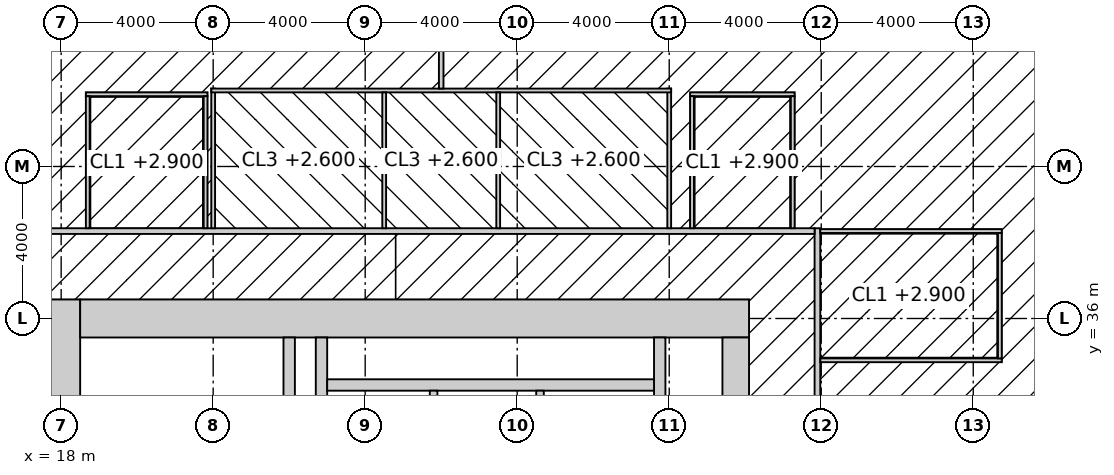
"""IFC4 building model, lengths in metres.
Left out: names, types, materials, properties, quantities, classifications, styles, units other than length and angle.
Written with IfcOpenShell. Run it as: python <this file> out.ifc"""

import sys

from ifc_helpers import new_model, si_unit, direction, frame, frame_2d, origin, place, context, subcontext, project, spatial, rectangle, extrude, element, fill, save


model = new_model("IFC4")
c1 = context("Model", 3, precision=1e-05, world=origin(), true_north=direction((0.0, 1.0)))
c2 = subcontext(c1, "Body", "Model", "MODEL_VIEW")
j1 = project(units=[si_unit("LENGTHUNIT", "METRE"), si_unit("PLANEANGLEUNIT", "RADIAN")], contexts=[c1])
p1 = place(None, origin())
s1 = spatial("IfcSite", under=j1, at=p1, CompositionType="ELEMENT")
p2 = place(p1, origin())
s2 = spatial("IfcBuilding", under=s1, at=p2, CompositionType="ELEMENT")
p3 = place(p2, frame((0.0, 0.0, 93.4)))
s3 = spatial("IfcBuildingStorey", under=s2, at=p3, CompositionType="ELEMENT", Elevation=93.4)
p4 = place(p3, frame((18.0, 17.5, -0.15), z_axis=(0.0, 0.0, 1.0), x_axis=(0.0, 1.0, 0.0)))
e1 = element("IfcWall", 1, at=p4, inside=s3, PredefinedType="SHEAR", context=c2, shape_type="SweptSolid", body=[
    extrude(rectangle(XDim=19.0, YDim=1.0, at=frame_2d((9.5, 0.0))), origin(), (0.0, 0.0, 1.0), 4.0),
])
p5 = place(p3, frame((18.5, 36.0, -0.15), z_axis=(0.0, 0.0, 1.0), x_axis=(1.0, 0.0, 0.0)))
e2 = element("IfcWall", 2, at=p5, inside=s3, PredefinedType="SHEAR", context=c2, shape_type="SweptSolid", body=[
    extrude(rectangle(XDim=17.6, YDim=1.0, at=frame_2d((8.8, 0.0))), origin(), (0.0, 0.0, 1.0), 4.0),
])
p6 = place(p3, frame((35.75, 18.5, -0.15), z_axis=(0.0, 0.0, 1.0), x_axis=(0.0, 1.0, 0.0)))
e3 = element("IfcWall", 3, at=p6, inside=s3, PredefinedType="SHEAR", context=c2, shape_type="SweptSolid", body=[
    extrude(rectangle(XDim=17.0, YDim=0.7, at=frame_2d((8.5, 0.0))), origin(), (0.0, 0.0, 1.0), 4.0),
])
p7 = place(p6, frame((9.85, 0.0, 0.15)))
e4 = element("IfcOpeningElement", 4, at=p7, cuts=e3, PredefinedType="OPENING", context=c2, shape_type="SweptSolid", body=[
    extrude(rectangle(XDim=1.0, YDim=2.2, at=frame_2d((0.5, 1.1))), frame((0.0, 0.36, 0.0), z_axis=(0.0, -1.0, 0.0), x_axis=(1.0, 0.0, 0.0)), (0.0, 0.0, 1.0), 0.72),
])
p8 = place(p3, frame((24.0, 18.5, -0.15), z_axis=(0.0, 0.0, 1.0), x_axis=(0.0, 1.0, 0.0)))
e5 = element("IfcWall", 5, at=p8, inside=s3, PredefinedType="SHEAR", context=c2, shape_type="SweptSolid", body=[
    extrude(rectangle(XDim=17.0, YDim=0.3, at=frame_2d((8.5, 0.0))), origin(), (0.0, 0.0, 1.0), 4.0),
])
p9 = place(p8, frame((9.6, 0.0, 0.15)))
e6 = element("IfcOpeningElement", 6, at=p9, cuts=e5, PredefinedType="OPENING", context=c2, shape_type="SweptSolid", body=[
    extrude(rectangle(XDim=1.5, YDim=2.4, at=frame_2d((0.75, 1.2))), frame((0.0, 0.16, 0.0), z_axis=(0.0, -1.0, 0.0), x_axis=(1.0, 0.0, 0.0)), (0.0, 0.0, 1.0), 0.32),
])
for number, where, z_axis, x_axis in (
    (7, (24.85, 31.3, -0.15), (0.0, 0.0, 1.0), (0.0, 1.0, 0.0)),
    (8, (33.75, 31.3, -0.15), (0.0, 0.0, 1.0), (0.0, 1.0, 0.0)),
):
    element("IfcWall", number, at=place(p3, frame(where, z_axis=z_axis, x_axis=x_axis)), inside=s3, PredefinedType="SHEAR", context=c2, shape_type="SweptSolid", body=[
        extrude(rectangle(XDim=4.2, YDim=0.3, at=frame_2d((2.1, 0.0))), origin(), (0.0, 0.0, 1.0), 4.0),
    ])
p10 = place(p3, frame((25.0, 34.25, -0.15), z_axis=(0.0, 0.0, 1.0), x_axis=(1.0, 0.0, 0.0)))
e9 = element("IfcWall", 9, at=p10, inside=s3, PredefinedType="SHEAR", context=c2, shape_type="SweptSolid", body=[
    extrude(rectangle(XDim=8.6, YDim=0.3, at=frame_2d((4.3, 0.0))), origin(), (0.0, 0.0, 1.0), 4.0),
])
for number, where, z_axis, x_axis in (
    (10, (27.8, 31.3, -0.15), (0.0, 0.0, 1.0), (0.0, 1.0, 0.0)),
    (11, (30.6, 31.3, -0.15), (0.0, 0.0, 1.0), (0.0, 1.0, 0.0)),
):
    element("IfcWall", number, at=place(p3, frame(where, z_axis=z_axis, x_axis=x_axis)), inside=s3, PredefinedType="SOLIDWALL", context=c2, shape_type="SweptSolid", body=[
        extrude(rectangle(XDim=2.8, YDim=0.2, at=frame_2d((1.4, 0.0))), origin(), (0.0, 0.0, 1.0), 4.0),
    ])
p11 = place(p3, frame((37.9, 15.625, 0.0), z_axis=(0.0, 0.0, 1.0), x_axis=(0.0, 1.0, 0.0)))
e12 = element("IfcWall", 12, at=p11, inside=s3, PredefinedType="PARTITIONING", context=c2, shape_type="SweptSolid", body=[
    extrude(rectangle(XDim=22.75, YDim=0.15, at=frame_2d((11.375, 0.0))), origin(), (0.0, 0.0, 1.0), 2.95),
])
p12 = place(p11, frame((4.974, 0.0, 0.0)))
e13 = element("IfcOpeningElement", 13, at=p12, cuts=e12, PredefinedType="OPENING", context=c2, shape_type="SweptSolid", body=[
    extrude(rectangle(XDim=1.8, YDim=2.4, at=frame_2d((0.9, 1.2))), frame((0.0, 0.085, 0.0), z_axis=(0.0, -1.0, 0.0), x_axis=(1.0, 0.0, 0.0)), (0.0, 0.0, 1.0), 0.17),
])
p13 = place(p11, frame((16.226, 0.0, 0.0)))
e14 = element("IfcOpeningElement", 14, at=p13, cuts=e12, PredefinedType="OPENING", context=c2, shape_type="SweptSolid", body=[
    extrude(rectangle(XDim=1.8, YDim=2.4, at=frame_2d((0.9, 1.2))), frame((0.0, 0.085, 0.0), z_axis=(0.0, -1.0, 0.0), x_axis=(1.0, 0.0, 0.0)), (0.0, 0.0, 1.0), 0.17),
])
p14 = place(p3, frame((15.775, 38.3, 0.0), z_axis=(0.0, 0.0, 1.0), x_axis=(1.0, 0.0, 0.0)))
e15 = element("IfcWall", 15, at=p14, inside=s3, PredefinedType="PARTITIONING", context=c2, shape_type="SweptSolid", body=[
    extrude(rectangle(XDim=22.05, YDim=0.15, at=frame_2d((11.025, 0.0))), origin(), (0.0, 0.0, 1.0), 3.85),
])
p15 = place(p14, frame((7.975, 0.0, 0.0)))
e16 = element("IfcOpeningElement", 16, at=p15, cuts=e15, PredefinedType="OPENING", context=c2, shape_type="SweptSolid", body=[
    extrude(rectangle(XDim=0.9, YDim=2.1, at=frame_2d((0.45, 1.05))), frame((0.0, 0.085, 0.0), z_axis=(0.0, -1.0, 0.0), x_axis=(1.0, 0.0, 0.0)), (0.0, 0.0, 1.0), 0.17),
])
p16 = place(p14, frame((11.725, 0.0, 0.0)))
e17 = element("IfcOpeningElement", 17, at=p16, cuts=e15, PredefinedType="OPENING", context=c2, shape_type="SweptSolid", body=[
    extrude(rectangle(XDim=1.0, YDim=2.1, at=frame_2d((0.5, 1.05))), frame((0.0, 0.085, 0.0), z_axis=(0.0, -1.0, 0.0), x_axis=(1.0, 0.0, 0.0)), (0.0, 0.0, 1.0), 0.17),
])
p17 = place(p14, frame((15.575, 0.0, 0.0)))
e18 = element("IfcOpeningElement", 18, at=p17, cuts=e15, PredefinedType="OPENING", context=c2, shape_type="SweptSolid", body=[
    extrude(rectangle(XDim=0.9, YDim=2.1, at=frame_2d((0.45, 1.05))), frame((0.0, 0.085, 0.0), z_axis=(0.0, -1.0, 0.0), x_axis=(1.0, 0.0, 0.0)), (0.0, 0.0, 1.0), 0.17),
])
for number, where, z_axis, x_axis in (
    (19, (22.0, 38.375, 0.0), (0.0, 0.0, 1.0), (0.0, 1.0, 0.0)),
    (20, (34.0, 38.375, 0.0), (0.0, 0.0, 1.0), (0.0, 1.0, 0.0)),
):
    element("IfcWall", number, at=place(p3, frame(where, z_axis=z_axis, x_axis=x_axis)), inside=s3, PredefinedType="PARTITIONING", context=c2, shape_type="SweptSolid", body=[
        extrude(rectangle(XDim=3.675, YDim=0.1, at=frame_2d((1.837, 0.0))), origin(), (0.0, 0.0, 1.0), 2.95),
    ])
p18 = place(p3, frame((21.95, 42.0, 0.0), z_axis=(0.0, 0.0, 1.0), x_axis=(1.0, 0.0, 0.0)))
e21 = element("IfcWall", 21, at=p18, inside=s3, PredefinedType="PARTITIONING", context=c2, shape_type="SweptSolid", body=[
    extrude(rectangle(XDim=12.1, YDim=0.1, at=frame_2d((6.05, 0.0))), origin(), (0.0, 0.0, 1.0), 3.85),
])
for number, where, z_axis, x_axis in (
    (22, (26.5, 38.375, 0.0), (0.0, 0.0, 1.0), (0.0, 1.0, 0.0)),
    (23, (29.5, 38.375, 0.0), (0.0, 0.0, 1.0), (0.0, 1.0, 0.0)),
):
    element("IfcWall", number, at=place(p3, frame(where, z_axis=z_axis, x_axis=x_axis)), inside=s3, PredefinedType="PARTITIONING", context=c2, shape_type="SweptSolid", body=[
        extrude(rectangle(XDim=3.575, YDim=0.1, at=frame_2d((1.788, 0.0))), origin(), (0.0, 0.0, 1.0), 3.85),
    ])
p19 = place(p3, frame((28.0, 42.05, 0.0), z_axis=(0.0, 0.0, 1.0), x_axis=(0.0, 1.0, 0.0)))
e24 = element("IfcWall", 24, at=p19, inside=s3, PredefinedType="PARTITIONING", context=c2, shape_type="SweptSolid", body=[
    extrude(rectangle(XDim=5.65, YDim=0.12, at=frame_2d((2.825, 0.0))), origin(), (0.0, 0.0, 1.0), 3.85),
])
for number, where, z_axis, x_axis in (
    (25, (37.975, 34.9, 0.0), (0.0, 0.0, 1.0), (1.0, 0.0, 0.0)),
    (26, (37.975, 38.3, 0.0), (0.0, 0.0, 1.0), (1.0, 0.0, 0.0)),
):
    element("IfcWall", number, at=place(p3, frame(where, z_axis=z_axis, x_axis=x_axis)), inside=s3, PredefinedType="PARTITIONING", context=c2, shape_type="SweptSolid", body=[
        extrude(rectangle(XDim=4.775, YDim=0.1, at=frame_2d((2.387, 0.0))), origin(), (0.0, 0.0, 1.0), 3.85),
    ])
p20 = place(p3, frame((18.65, 41.9, 0.0), z_axis=(0.0, 0.0, 1.0), x_axis=(1.0, 0.0, 0.0)))
e27 = element("IfcWall", 27, at=p20, inside=s3, PredefinedType="PARTITIONING", context=c2, shape_type="SweptSolid", body=[
    extrude(rectangle(XDim=3.2, YDim=0.1, at=frame_2d((1.6, 0.0))), origin(), (0.0, 0.0, 1.0), 3.85),
])
p21 = place(p20, frame((1.1, 0.0, 0.0)))
e28 = element("IfcOpeningElement", 28, at=p21, cuts=e27, PredefinedType="OPENING", context=c2, shape_type="SweptSolid", body=[
    extrude(rectangle(XDim=1.0, YDim=2.2, at=frame_2d((0.5, 1.1))), frame((0.0, 0.06, 0.0), z_axis=(0.0, -1.0, 0.0), x_axis=(1.0, 0.0, 0.0)), (0.0, 0.0, 1.0), 0.12),
])
p22 = place(p3, frame((34.55, 41.9, 0.0), z_axis=(0.0, 0.0, 1.0), x_axis=(1.0, 0.0, 0.0)))
e29 = element("IfcWall", 29, at=p22, inside=s3, PredefinedType="PARTITIONING", context=c2, shape_type="SweptSolid", body=[
    extrude(rectangle(XDim=2.75, YDim=0.1, at=frame_2d((1.375, 0.0))), origin(), (0.0, 0.0, 1.0), 3.85),
])
p23 = place(p22, frame((0.875, 0.0, 0.0)))
e30 = element("IfcOpeningElement", 30, at=p23, cuts=e29, PredefinedType="OPENING", context=c2, shape_type="SweptSolid", body=[
    extrude(rectangle(XDim=1.0, YDim=2.2, at=frame_2d((0.5, 1.1))), frame((0.0, 0.06, 0.0), z_axis=(0.0, -1.0, 0.0), x_axis=(1.0, 0.0, 0.0)), (0.0, 0.0, 1.0), 0.12),
])
for number, where, z_axis, x_axis in (
    (31, (18.7, 38.375, 0.0), (0.0, 0.0, 1.0), (0.0, 1.0, 0.0)),
    (32, (21.8, 38.375, 0.0), (0.0, 0.0, 1.0), (0.0, 1.0, 0.0)),
    (33, (34.6, 38.375, 0.0), (0.0, 0.0, 1.0), (0.0, 1.0, 0.0)),
    (34, (37.25, 38.375, 0.0), (0.0, 0.0, 1.0), (0.0, 1.0, 0.0)),
):
    element("IfcWall", number, at=place(p3, frame(where, z_axis=z_axis, x_axis=x_axis)), inside=s3, PredefinedType="PARTITIONING", context=c2, shape_type="SweptSolid", body=[
        extrude(rectangle(XDim=3.475, YDim=0.1, at=frame_2d((1.738, 0.0))), origin(), (0.0, 0.0, 1.0), 3.85),
    ])
p24 = place(p3, frame((42.7, 34.95, 0.0), z_axis=(0.0, 0.0, 1.0), x_axis=(0.0, 1.0, 0.0)))
e35 = element("IfcWall", 35, at=p24, inside=s3, PredefinedType="PARTITIONING", context=c2, shape_type="SweptSolid", body=[
    extrude(rectangle(XDim=3.3, YDim=0.1, at=frame_2d((1.65, 0.0))), origin(), (0.0, 0.0, 1.0), 3.85),
])
p25 = place(p24, frame((1.15, 0.0, 0.0)))
e36 = element("IfcOpeningElement", 36, at=p25, cuts=e35, PredefinedType="OPENING", context=c2, shape_type="SweptSolid", body=[
    extrude(rectangle(XDim=1.0, YDim=2.2, at=frame_2d((0.5, 1.1))), frame((0.0, 0.06, 0.0), z_axis=(0.0, -1.0, 0.0), x_axis=(1.0, 0.0, 0.0)), (0.0, 0.0, 1.0), 0.12),
])
p26 = place(p15, origin())
e37 = element("IfcDoor", 37, at=p26, inside=s3, OperationType="SINGLE_SWING_LEFT", PredefinedType="DOOR", context=c2, shape_type="SweptSolid", body=[
    extrude(rectangle(XDim=0.9, YDim=2.1, at=frame_2d((0.45, 1.05))), frame((0.0, 0.025, 0.0), z_axis=(0.0, -1.0, 0.0), x_axis=(1.0, 0.0, 0.0)), (0.0, 0.0, 1.0), 0.05),
])
fill(e16, e37)
p27 = place(p16, origin())
e38 = element("IfcDoor", 38, at=p27, inside=s3, OperationType="SLIDING_TO_LEFT", PredefinedType="DOOR", context=c2, shape_type="SweptSolid", body=[
    extrude(rectangle(XDim=1.0, YDim=2.1, at=frame_2d((0.5, 1.05))), frame((0.0, 0.025, 0.0), z_axis=(0.0, -1.0, 0.0), x_axis=(1.0, 0.0, 0.0)), (0.0, 0.0, 1.0), 0.05),
])
fill(e17, e38)
p28 = place(p17, origin())
e39 = element("IfcDoor", 39, at=p28, inside=s3, OperationType="SINGLE_SWING_LEFT", PredefinedType="DOOR", context=c2, shape_type="SweptSolid", body=[
    extrude(rectangle(XDim=0.9, YDim=2.1, at=frame_2d((0.45, 1.05))), frame((0.0, 0.025, 0.0), z_axis=(0.0, -1.0, 0.0), x_axis=(1.0, 0.0, 0.0)), (0.0, 0.0, 1.0), 0.05),
])
fill(e18, e39)
p29 = place(p21, origin())
e40 = element("IfcDoor", 40, at=p29, inside=s3, OperationType="SINGLE_SWING_LEFT", PredefinedType="DOOR", context=c2, shape_type="SweptSolid", body=[
    extrude(rectangle(XDim=1.0, YDim=2.2, at=frame_2d((0.5, 1.1))), frame((0.0, 0.025, 0.0), z_axis=(0.0, -1.0, 0.0), x_axis=(1.0, 0.0, 0.0)), (0.0, 0.0, 1.0), 0.05),
])
fill(e28, e40)
p30 = place(p25, origin())
e41 = element("IfcDoor", 41, at=p30, inside=s3, OperationType="SINGLE_SWING_LEFT", PredefinedType="DOOR", context=c2, shape_type="SweptSolid", body=[
    extrude(rectangle(XDim=1.0, YDim=2.2, at=frame_2d((0.5, 1.1))), frame((0.0, 0.025, 0.0), z_axis=(0.0, -1.0, 0.0), x_axis=(1.0, 0.0, 0.0)), (0.0, 0.0, 1.0), 0.05),
])
fill(e36, e41)
p31 = place(p23, origin())
e42 = element("IfcDoor", 42, at=p31, inside=s3, OperationType="SINGLE_SWING_LEFT", PredefinedType="DOOR", context=c2, shape_type="SweptSolid", body=[
    extrude(rectangle(XDim=1.0, YDim=2.2, at=frame_2d((0.5, 1.1))), frame((0.0, 0.025, 0.0), z_axis=(0.0, -1.0, 0.0), x_axis=(1.0, 0.0, 0.0)), (0.0, 0.0, 1.0), 0.05),
])
fill(e30, e42)
save(model, sys.argv[1])
